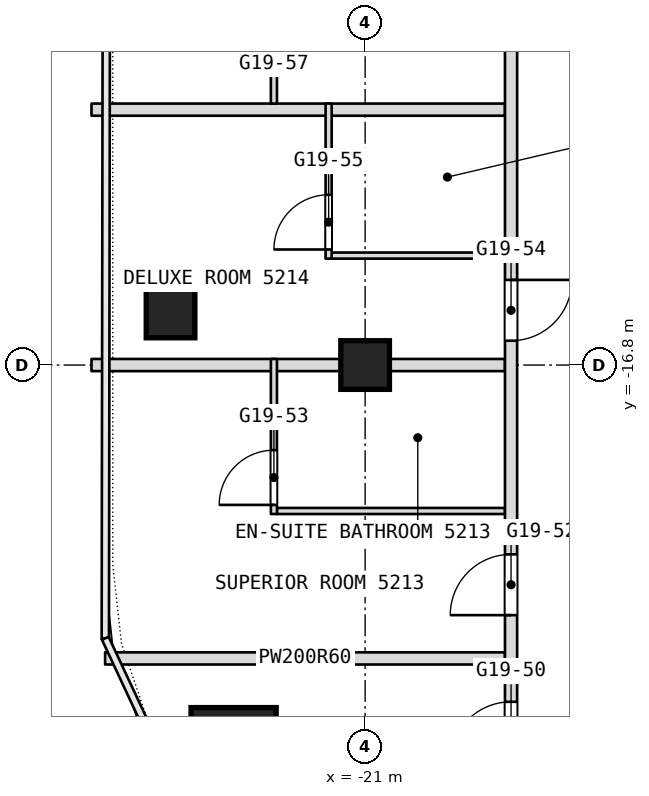
"""IFC4 building model, lengths in metres.
Left out: names, types, materials, properties, quantities, classifications, styles, units other than length and angle.
Written with IfcOpenShell. Run it as: python <this file> out.ifc"""

import sys

from ifc_helpers import new_model, si_unit, direction, frame, frame_2d, origin, origin_2d, place, context, subcontext, project, spatial, rectangle, extrude, element, fill, save


model = new_model("IFC4")
c1 = context("Model", 3, precision=1e-05, world=origin(), true_north=direction((0.0, 1.0)))
c2 = subcontext(c1, "Body", "Model", "MODEL_VIEW")
j1 = project(units=[si_unit("LENGTHUNIT", "METRE"), si_unit("PLANEANGLEUNIT", "RADIAN")], contexts=[c1])
p1 = place(None, origin())
s1 = spatial("IfcSite", under=j1, at=p1, CompositionType="ELEMENT")
p2 = place(p1, origin())
s2 = spatial("IfcBuilding", under=s1, at=p2, CompositionType="ELEMENT")
p3 = place(p2, frame((0.0, 0.0, 223.7)))
s3 = spatial("IfcBuildingStorey", under=s2, at=p3, CompositionType="ELEMENT", Elevation=223.7)
p4 = place(p3, frame((-23.163, -23.133, 0.0), z_axis=(0.0, 0.0, 1.0), x_axis=(1.0, 0.0, 0.0)))
e1 = element("IfcColumn", 1, at=p4, inside=s3, PredefinedType="COLUMN", context=c2, shape_type="SweptSolid", body=[
    extrude(rectangle(XDim=1.4, YDim=1.4, at=origin_2d()), origin(), (0.0, 0.0, 1.0), 3.6),
])
for number, where, z_axis, x_axis in (
    (2, (-21.0, -16.8, 0.0), (0.0, 0.0, 1.0), (1.0, 0.0, 0.0)),
    (3, (-24.2, -15.952, 0.0), (0.0, 0.0, 1.0), (1.0, 0.0, 0.0)),
):
    element("IfcColumn", number, at=place(p3, frame(where, z_axis=z_axis, x_axis=x_axis)), inside=s3, PredefinedType="COLUMN", context=c2, shape_type="SweptSolid", body=[
        extrude(rectangle(XDim=0.8, YDim=0.8, at=origin_2d()), origin(), (0.0, 0.0, 1.0), 3.6),
    ])
p5 = place(p3, frame((-25.276, -21.625, 0.0), z_axis=(0.0, 0.0, 1.0), x_axis=(1.0, 0.0, 0.0)))
e4 = element("IfcWall", 4, at=p5, inside=s3, PredefinedType="PARTITIONING", context=c2, shape_type="SweptSolid", body=[
    extrude(rectangle(XDim=6.576, YDim=0.2, at=frame_2d((3.288, 0.0))), origin(), (0.0, 0.0, 1.0), 3.34),
])
p6 = place(p3, frame((-22.45, -19.2, 0.0), z_axis=(0.0, 0.0, 1.0), x_axis=(1.0, 0.0, 0.0)))
e5 = element("IfcWall", 5, at=p6, inside=s3, PredefinedType="PARTITIONING", context=c2, shape_type="SweptSolid", body=[
    extrude(rectangle(XDim=3.75, YDim=0.1, at=frame_2d((1.875, 0.0))), origin(), (0.0, 0.0, 1.0), 3.34),
])
p7 = place(p3, frame((-25.5, -16.8, 0.0), z_axis=(0.0, 0.0, 1.0), x_axis=(1.0, 0.0, 0.0)))
e6 = element("IfcWall", 6, at=p7, inside=s3, PredefinedType="PARTITIONING", context=c2, shape_type="SweptSolid", body=[
    extrude(rectangle(XDim=6.8, YDim=0.2, at=frame_2d((3.4, 0.0))), origin(), (0.0, 0.0, 1.0), 2.94),
])
p8 = place(p3, frame((-21.55, -15.0, 0.0), z_axis=(0.0, 0.0, 1.0), x_axis=(1.0, 0.0, 0.0)))
e7 = element("IfcWall", 7, at=p8, inside=s3, PredefinedType="PARTITIONING", context=c2, shape_type="SweptSolid", body=[
    extrude(rectangle(XDim=2.85, YDim=0.1, at=frame_2d((1.425, 0.0))), origin(), (0.0, 0.0, 1.0), 3.34),
])
p9 = place(p3, frame((-25.5, -12.6, 0.0), z_axis=(0.0, 0.0, 1.0), x_axis=(1.0, 0.0, 0.0)))
e8 = element("IfcWall", 8, at=p9, inside=s3, PredefinedType="PARTITIONING", context=c2, shape_type="SweptSolid", body=[
    extrude(rectangle(XDim=6.8, YDim=0.2, at=frame_2d((3.4, 0.0))), origin(), (0.0, 0.0, 1.0), 3.34),
])
p10 = place(p3, frame((-18.6, -26.751, 0.0), z_axis=(0.0, 0.0, 1.0), x_axis=(0.0, 1.0, 0.0)))
e9 = element("IfcWall", 9, at=p10, inside=s3, PredefinedType="PARTITIONING", context=c2, shape_type="SweptSolid", body=[
    extrude(rectangle(XDim=49.091, YDim=0.2, at=frame_2d((24.545, 0.0))), origin(), (0.0, 0.0, 1.0), 3.34),
])
p11 = place(p10, frame((3.413, 0.0, 0.0)))
e10 = element("IfcOpeningElement", 10, at=p11, cuts=e9, PredefinedType="OPENING", context=c2, shape_type="SweptSolid", body=[
    extrude(rectangle(XDim=1.0, YDim=2.1, at=frame_2d((0.5, 1.05))), frame((0.0, 0.1, 0.0), z_axis=(0.0, -1.0, 0.0), x_axis=(1.0, 0.0, 0.0)), (0.0, 0.0, 1.0), 0.2),
])
p12 = place(p10, frame((5.838, 0.0, 0.0)))
e11 = element("IfcOpeningElement", 11, at=p12, cuts=e9, PredefinedType="OPENING", context=c2, shape_type="SweptSolid", body=[
    extrude(rectangle(XDim=1.0, YDim=2.1, at=frame_2d((0.5, 1.05))), frame((0.0, 0.1, 0.0), z_axis=(0.0, -1.0, 0.0), x_axis=(1.0, 0.0, 0.0)), (0.0, 0.0, 1.0), 0.2),
])
p13 = place(p10, frame((10.351, 0.0, 0.0)))
e12 = element("IfcOpeningElement", 12, at=p13, cuts=e9, PredefinedType="OPENING", context=c2, shape_type="SweptSolid", body=[
    extrude(rectangle(XDim=1.0, YDim=2.1, at=frame_2d((0.5, 1.05))), frame((0.0, 0.1, 0.0), z_axis=(0.0, -1.0, 0.0), x_axis=(1.0, 0.0, 0.0)), (0.0, 0.0, 1.0), 0.2),
])
p14 = place(p10, frame((16.951, 0.0, 0.0)))
e13 = element("IfcOpeningElement", 13, at=p14, cuts=e9, PredefinedType="OPENING", context=c2, shape_type="SweptSolid", body=[
    extrude(rectangle(XDim=1.0, YDim=2.1, at=frame_2d((0.5, 1.05))), frame((0.0, 0.1, 0.0), z_axis=(0.0, -1.0, 0.0), x_axis=(1.0, 0.0, 0.0)), (0.0, 0.0, 1.0), 0.2),
])
p15 = place(p10, frame((21.151, 0.0, 0.0)))
e14 = element("IfcOpeningElement", 14, at=p15, cuts=e9, PredefinedType="OPENING", context=c2, shape_type="SweptSolid", body=[
    extrude(rectangle(XDim=1.0, YDim=2.1, at=frame_2d((0.5, 1.05))), frame((0.0, 0.1, 0.0), z_axis=(0.0, -1.0, 0.0), x_axis=(1.0, 0.0, 0.0)), (0.0, 0.0, 1.0), 0.2),
])
p16 = place(p10, frame((22.951, 0.0, 0.0)))
e15 = element("IfcOpeningElement", 15, at=p16, cuts=e9, PredefinedType="OPENING", context=c2, shape_type="SweptSolid", body=[
    extrude(rectangle(XDim=1.0, YDim=2.1, at=frame_2d((0.5, 1.05))), frame((0.0, 0.1, 0.0), z_axis=(0.0, -1.0, 0.0), x_axis=(1.0, 0.0, 0.0)), (0.0, 0.0, 1.0), 0.2),
])
p17 = place(p10, frame((30.351, 0.0, 0.0)))
e16 = element("IfcOpeningElement", 16, at=p17, cuts=e9, PredefinedType="OPENING", context=c2, shape_type="SweptSolid", body=[
    extrude(rectangle(XDim=1.1, YDim=2.1, at=frame_2d((0.55, 1.05))), frame((0.0, 0.1, 0.0), z_axis=(0.0, -1.0, 0.0), x_axis=(1.0, 0.0, 0.0)), (0.0, 0.0, 1.0), 0.2),
])
p18 = place(p10, frame((37.951, 0.0, 0.0)))
e17 = element("IfcOpeningElement", 17, at=p18, cuts=e9, PredefinedType="OPENING", context=c2, shape_type="SweptSolid", body=[
    extrude(rectangle(XDim=1.0, YDim=2.1, at=frame_2d((0.5, 1.05))), frame((0.0, 0.1, 0.0), z_axis=(0.0, -1.0, 0.0), x_axis=(1.0, 0.0, 0.0)), (0.0, 0.0, 1.0), 0.2),
])
p19 = place(p10, frame((39.751, 0.0, 0.0)))
e18 = element("IfcOpeningElement", 18, at=p19, cuts=e9, PredefinedType="OPENING", context=c2, shape_type="SweptSolid", body=[
    extrude(rectangle(XDim=1.0, YDim=2.1, at=frame_2d((0.5, 1.05))), frame((0.0, 0.1, 0.0), z_axis=(0.0, -1.0, 0.0), x_axis=(1.0, 0.0, 0.0)), (0.0, 0.0, 1.0), 0.2),
])
p20 = place(p10, frame((44.051, 0.0, 0.0)))
e19 = element("IfcOpeningElement", 19, at=p20, cuts=e9, PredefinedType="OPENING", context=c2, shape_type="SweptSolid", body=[
    extrude(rectangle(XDim=1.0, YDim=2.1, at=frame_2d((0.5, 1.05))), frame((0.0, 0.1, 0.0), z_axis=(0.0, -1.0, 0.0), x_axis=(1.0, 0.0, 0.0)), (0.0, 0.0, 1.0), 0.2),
])
p21 = place(p3, frame((-21.6, -15.05, 0.0), z_axis=(0.0, 0.0, 1.0), x_axis=(0.0, 1.0, 0.0)))
e20 = element("IfcWall", 20, at=p21, inside=s3, PredefinedType="PARTITIONING", context=c2, shape_type="SweptSolid", body=[
    extrude(rectangle(XDim=2.55, YDim=0.1, at=frame_2d((1.275, 0.0))), origin(), (0.0, 0.0, 1.0), 3.34),
])
p22 = place(p21, frame((0.15, 0.0, 0.0)))
e21 = element("IfcOpeningElement", 21, at=p22, cuts=e20, PredefinedType="OPENING", context=c2, shape_type="SweptSolid", body=[
    extrude(rectangle(XDim=0.9, YDim=2.1, at=frame_2d((0.45, 1.05))), frame((0.0, 0.05, 0.0), z_axis=(0.0, -1.0, 0.0), x_axis=(1.0, 0.0, 0.0)), (0.0, 0.0, 1.0), 0.1),
])
p23 = place(p3, frame((-22.5, -19.25, 0.0), z_axis=(0.0, 0.0, 1.0), x_axis=(0.0, 1.0, 0.0)))
e22 = element("IfcWall", 22, at=p23, inside=s3, PredefinedType="PARTITIONING", context=c2, shape_type="SweptSolid", body=[
    extrude(rectangle(XDim=2.55, YDim=0.1, at=frame_2d((1.275, 0.0))), origin(), (0.0, 0.0, 1.0), 3.34),
])
p24 = place(p23, frame((0.15, 0.0, 0.0)))
e23 = element("IfcOpeningElement", 23, at=p24, cuts=e22, PredefinedType="OPENING", context=c2, shape_type="SweptSolid", body=[
    extrude(rectangle(XDim=0.9, YDim=2.1, at=frame_2d((0.45, 1.05))), frame((0.0, 0.05, 0.0), z_axis=(0.0, -1.0, 0.0), x_axis=(1.0, 0.0, 0.0)), (0.0, 0.0, 1.0), 0.1),
])
p25 = place(p3, frame((-22.5, -12.5, 0.0), z_axis=(0.0, 0.0, 1.0), x_axis=(0.0, 1.0, 0.0)))
e24 = element("IfcWall", 24, at=p25, inside=s3, PredefinedType="PARTITIONING", context=c2, shape_type="SweptSolid", body=[
    extrude(rectangle(XDim=2.25, YDim=0.1, at=frame_2d((1.125, 0.0))), origin(), (0.0, 0.0, 1.0), 3.34),
])
p26 = place(p25, frame((1.2, 0.0, 0.0)))
e25 = element("IfcOpeningElement", 25, at=p26, cuts=e24, PredefinedType="OPENING", context=c2, shape_type="SweptSolid", body=[
    extrude(rectangle(XDim=0.9, YDim=2.1, at=frame_2d((0.45, 1.05))), frame((0.0, 0.05, 0.0), z_axis=(0.0, -1.0, 0.0), x_axis=(1.0, 0.0, 0.0)), (0.0, 0.0, 1.0), 0.1),
])
p27 = place(p11, origin())
e26 = element("IfcDoor", 26, at=p27, inside=s3, OperationType="SINGLE_SWING_LEFT", PredefinedType="DOOR", context=c2, shape_type="SweptSolid", body=[
    extrude(rectangle(XDim=1.0, YDim=2.1, at=frame_2d((0.5, 1.05))), frame((0.0, 0.025, 0.0), z_axis=(0.0, -1.0, 0.0), x_axis=(1.0, 0.0, 0.0)), (0.0, 0.0, 1.0), 0.05),
])
fill(e10, e26)
p28 = place(p12, origin())
e27 = element("IfcDoor", 27, at=p28, inside=s3, OperationType="SINGLE_SWING_LEFT", PredefinedType="DOOR", context=c2, shape_type="SweptSolid", body=[
    extrude(rectangle(XDim=1.0, YDim=2.1, at=frame_2d((0.5, 1.05))), frame((0.0, 0.025, 0.0), z_axis=(0.0, -1.0, 0.0), x_axis=(1.0, 0.0, 0.0)), (0.0, 0.0, 1.0), 0.05),
])
fill(e11, e27)
p29 = place(p13, origin())
e28 = element("IfcDoor", 28, at=p29, inside=s3, OperationType="SINGLE_SWING_LEFT", PredefinedType="DOOR", context=c2, shape_type="SweptSolid", body=[
    extrude(rectangle(XDim=1.0, YDim=2.1, at=frame_2d((0.5, 1.05))), frame((0.0, 0.025, 0.0), z_axis=(0.0, -1.0, 0.0), x_axis=(1.0, 0.0, 0.0)), (0.0, 0.0, 1.0), 0.05),
])
fill(e12, e28)
p30 = place(p22, origin())
e29 = element("IfcDoor", 29, at=p30, inside=s3, OperationType="SINGLE_SWING_RIGHT", PredefinedType="DOOR", context=c2, shape_type="SweptSolid", body=[
    extrude(rectangle(XDim=0.9, YDim=2.1, at=frame_2d((0.45, 1.05))), frame((0.0, 0.025, 0.0), z_axis=(0.0, -1.0, 0.0), x_axis=(1.0, 0.0, 0.0)), (0.0, 0.0, 1.0), 0.05),
])
fill(e21, e29)
p31 = place(p24, origin())
e30 = element("IfcDoor", 30, at=p31, inside=s3, OperationType="SINGLE_SWING_RIGHT", PredefinedType="DOOR", context=c2, shape_type="SweptSolid", body=[
    extrude(rectangle(XDim=0.9, YDim=2.1, at=frame_2d((0.45, 1.05))), frame((0.0, 0.025, 0.0), z_axis=(0.0, -1.0, 0.0), x_axis=(1.0, 0.0, 0.0)), (0.0, 0.0, 1.0), 0.05),
])
fill(e23, e30)
save(model, sys.argv[1])
